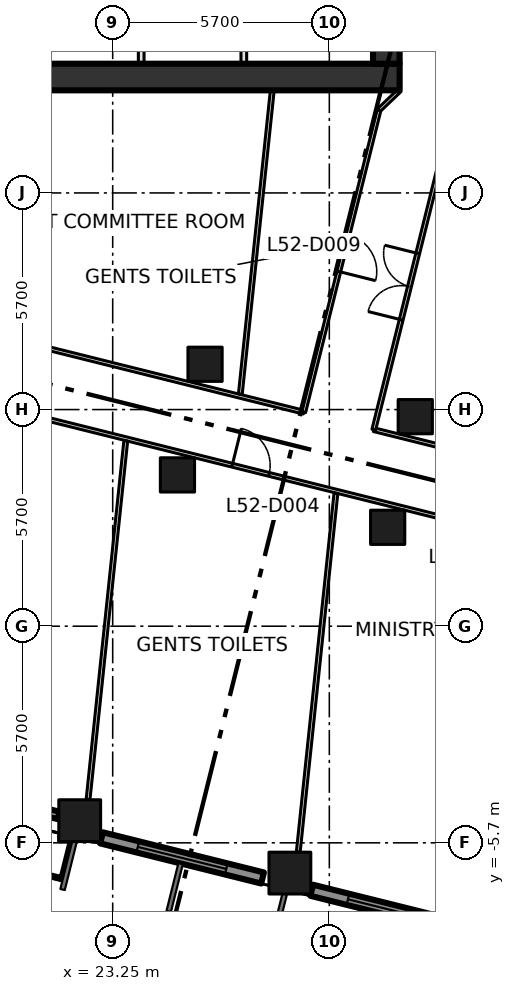
"""IFC4 building model, lengths in metres.
Left out: names, types, materials, properties, quantities, classifications, styles, units other than length and angle.
Written with IfcOpenShell. Run it as: python <this file> out.ifc"""

import sys

from ifc_helpers import new_model, si_unit, direction, frame, frame_2d, origin, origin_2d, place, context, subcontext, project, spatial, rectangle, extrude, element, fill, save


model = new_model("IFC4")
c1 = context("Model", 3, precision=1e-05, world=origin(), true_north=direction((0.0, 1.0)))
c2 = subcontext(c1, "Body", "Model", "MODEL_VIEW")
j1 = project(units=[si_unit("LENGTHUNIT", "METRE"), si_unit("PLANEANGLEUNIT", "RADIAN")], contexts=[c1])
p1 = place(None, origin())
s1 = spatial("IfcSite", under=j1, at=p1, CompositionType="ELEMENT")
p2 = place(p1, origin())
s2 = spatial("IfcBuilding", under=s1, at=p2, CompositionType="ELEMENT")
p3 = place(p2, frame((0.0, 0.0, 229.8)))
s3 = spatial("IfcBuildingStorey", under=s2, at=p3, CompositionType="ELEMENT", Elevation=229.8)
for number, where, z_axis, x_axis in (
    (1, (22.382, -5.117, 0.0), (0.0, 0.0, 1.0), (1.0, 0.0, 0.0)),
    (2, (27.912, -6.496, 0.0), (0.0, 0.0, 1.0), (1.0, 0.0, 0.0)),
):
    element("IfcColumn", number, at=place(p3, frame(where, z_axis=z_axis, x_axis=x_axis)), inside=s3, PredefinedType="COLUMN", context=c2, shape_type="SweptSolid", body=[
        extrude(rectangle(XDim=1.1, YDim=1.1, at=origin_2d()), origin(), (0.0, 0.0, 1.0), 4.2),
    ])
for number, where, z_axis, x_axis in (
    (3, (24.954, 3.981, 0.0), (0.0, 0.0, 1.0), (1.0, 0.0, 0.0)),
    (4, (30.485, 2.602, 0.0), (0.0, 0.0, 1.0), (1.0, 0.0, 0.0)),
    (5, (25.68, 6.892, 0.0), (0.0, 0.0, 1.0), (1.0, 0.0, 0.0)),
    (6, (31.211, 5.513, 0.0), (0.0, 0.0, 1.0), (1.0, 0.0, 0.0)),
):
    element("IfcColumn", number, at=place(p3, frame(where, z_axis=z_axis, x_axis=x_axis)), inside=s3, PredefinedType="COLUMN", context=c2, shape_type="SweptSolid", body=[
        extrude(rectangle(XDim=0.9, YDim=0.9, at=origin_2d()), origin(), (0.0, 0.0, 1.0), 4.2),
    ])
p4 = place(p3, frame((8.0, 14.45, -0.3), z_axis=(0.0, 0.0, 1.0), x_axis=(1.0, 0.0, 0.0)))
e7 = element("IfcWall", 7, at=p4, inside=s3, PredefinedType="SHEAR", context=c2, shape_type="SweptSolid", body=[
    extrude(rectangle(XDim=22.8, YDim=0.7, at=frame_2d((11.4, 0.0))), origin(), (0.0, 0.0, 1.0), 4.2),
])
p5 = place(p4, frame((2.3, 0.0, 0.3)))
e8 = element("IfcOpeningElement", 8, at=p5, cuts=e7, PredefinedType="OPENING", context=c2, shape_type="SweptSolid", body=[
    extrude(rectangle(XDim=1.8, YDim=2.1, at=frame_2d((0.9, 1.05))), frame((0.0, 0.36, 0.0), z_axis=(0.0, -1.0, 0.0), x_axis=(1.0, 0.0, 0.0)), (0.0, 0.0, 1.0), 0.72),
])
p6 = place(p3, frame((30.45, 14.8, -0.3), z_axis=(0.0, 0.0, 1.0), x_axis=(0.0, 1.0, 0.0)))
e9 = element("IfcWall", 9, at=p6, inside=s3, PredefinedType="SHEAR", context=c2, shape_type="SweptSolid", body=[
    extrude(rectangle(XDim=20.9, YDim=0.7, at=frame_2d((10.45, 0.0))), origin(), (0.0, 0.0, 1.0), 4.2),
])
for number, where, z_axis, x_axis in (
    (10, (24.0, 14.8, 0.0), (0.0, 0.0, 1.0), (0.0, 1.0, 0.0)),
    (11, (26.7, 14.8, 0.0), (0.0, 0.0, 1.0), (0.0, 1.0, 0.0)),
):
    element("IfcWall", number, at=place(p3, frame(where, z_axis=z_axis, x_axis=x_axis)), inside=s3, PredefinedType="PARTITIONING", context=c2, shape_type="SweptSolid", body=[
        extrude(rectangle(XDim=2.825, YDim=0.15, at=frame_2d((1.413, 0.0))), origin(), (0.0, 0.0, 1.0), 3.9),
    ])
p7 = place(p3, frame((17.401, -3.875, 0.0), z_axis=(0.0, 0.0, 1.0), x_axis=(0.970286982272, -0.241956963183, 0.0)))
e12 = element("IfcWall", 12, at=p7, inside=s3, PredefinedType="SOLIDWALL", context=c2, shape_type="SweptSolid", body=[
    extrude(rectangle(XDim=4.567, YDim=0.2, at=frame_2d((2.283, 0.0))), origin(), (0.0, 0.0, 1.0), 3.15),
])
p8 = place(p7, frame((1.383, 0.0, 0.0)))
e13 = element("IfcOpeningElement", 13, at=p8, cuts=e12, PredefinedType="OPENING", context=c2, shape_type="SweptSolid", body=[
    extrude(rectangle(XDim=1.8, YDim=2.9, at=frame_2d((0.9, 1.45))), frame((0.0, 0.11, 0.0), z_axis=(0.0, -1.0, 0.0), x_axis=(1.0, 0.0, 0.0)), (0.0, 0.0, 1.0), 0.22),
])
p9 = place(p3, frame((16.694, -5.069, 0.0), z_axis=(0.0, 0.0, 1.0), x_axis=(0.970289679319, -0.241946147329, 0.0)))
e14 = element("IfcWall", 14, at=p9, inside=s3, PredefinedType="SOLIDWALL", context=c2, shape_type="SweptSolid", body=[
    extrude(rectangle(XDim=5.36, YDim=0.4, at=frame_2d((2.68, 0.0))), origin(), (0.0, 0.0, 1.0), 0.3),
])
p10 = place(p3, frame((22.956, -5.569, 0.0), z_axis=(0.0, 0.0, 1.0), x_axis=(0.970323116569, -0.241812012628, 0.0)))
e15 = element("IfcWall", 15, at=p10, inside=s3, PredefinedType="SOLIDWALL", context=c2, shape_type="SweptSolid", body=[
    extrude(rectangle(XDim=4.367, YDim=0.3, at=frame_2d((2.183, 0.0))), origin(), (0.0, 0.0, 1.0), 3.15),
])
p11 = place(p10, frame((0.983, 0.0, 0.8)))
e16 = element("IfcOpeningElement", 16, at=p11, cuts=e15, PredefinedType="OPENING", context=c2, shape_type="SweptSolid", body=[
    extrude(rectangle(XDim=2.4, YDim=2.1, at=frame_2d((1.2, 1.05))), frame((0.0, 0.16, 0.0), z_axis=(0.0, -1.0, 0.0), x_axis=(1.0, 0.0, 0.0)), (0.0, 0.0, 1.0), 0.32),
])
p12 = place(p3, frame((28.486, -6.948, 0.0), z_axis=(0.0, 0.0, 1.0), x_axis=(0.970336189295, -0.241759549438, 0.0)))
e17 = element("IfcWall", 17, at=p12, inside=s3, PredefinedType="SOLIDWALL", context=c2, shape_type="SweptSolid", body=[
    extrude(rectangle(XDim=4.368, YDim=0.3, at=frame_2d((2.184, 0.0))), origin(), (0.0, 0.0, 1.0), 3.15),
])
p13 = place(p12, frame((0.983, 0.0, 0.8)))
e18 = element("IfcOpeningElement", 18, at=p13, cuts=e17, PredefinedType="OPENING", context=c2, shape_type="SweptSolid", body=[
    extrude(rectangle(XDim=2.4, YDim=2.1, at=frame_2d((1.2, 1.05))), frame((0.0, 0.16, 0.0), z_axis=(0.0, -1.0, 0.0), x_axis=(1.0, 0.0, 0.0)), (0.0, 0.0, 1.0), 0.32),
])
p14 = place(p3, frame((8.55, 8.685, 0.0), z_axis=(0.0, 0.0, 1.0), x_axis=(0.970297101369, -0.241916380335, 0.0)))
e19 = element("IfcWall", 19, at=p14, inside=s3, PredefinedType="PARTITIONING", context=c2, shape_type="SweptSolid", body=[
    extrude(rectangle(XDim=51.675, YDim=0.1, at=frame_2d((25.837, 0.0))), origin(), (0.0, 0.0, 1.0), 3.9),
])
p15 = place(p14, frame((18.391, 0.0, 0.0)))
e20 = element("IfcOpeningElement", 20, at=p15, cuts=e19, PredefinedType="OPENING", context=c2, shape_type="SweptSolid", body=[
    extrude(rectangle(XDim=1.0, YDim=2.1, at=frame_2d((0.5, 1.05))), frame((0.0, 0.06, 0.0), z_axis=(0.0, -1.0, 0.0), x_axis=(1.0, 0.0, 0.0)), (0.0, 0.0, 1.0), 0.12),
])
p16 = place(p14, frame((24.69, 0.0, 0.0)))
e21 = element("IfcOpeningElement", 21, at=p16, cuts=e19, PredefinedType="OPENING", context=c2, shape_type="SweptSolid", body=[
    extrude(rectangle(XDim=1.0, YDim=2.1, at=frame_2d((0.5, 1.05))), frame((0.0, 0.06, 0.0), z_axis=(0.0, -1.0, 0.0), x_axis=(1.0, 0.0, 0.0)), (0.0, 0.0, 1.0), 0.12),
])
p17 = place(p14, frame((29.99, 0.0, 0.0)))
e22 = element("IfcOpeningElement", 22, at=p17, cuts=e19, PredefinedType="OPENING", context=c2, shape_type="SweptSolid", body=[
    extrude(rectangle(XDim=1.8, YDim=2.1, at=frame_2d((0.9, 1.05))), frame((0.0, 0.06, 0.0), z_axis=(0.0, -1.0, 0.0), x_axis=(1.0, 0.0, 0.0)), (0.0, 0.0, 1.0), 0.12),
])
p18 = place(p14, frame((6.58, 0.0, 0.0)))
e23 = element("IfcOpeningElement", 23, at=p18, cuts=e19, PredefinedType="OPENING", context=c2, shape_type="SweptSolid", body=[
    extrude(rectangle(XDim=1.8, YDim=2.1, at=frame_2d((0.9, 1.05))), frame((0.0, 0.06, 0.0), z_axis=(0.0, -1.0, 0.0), x_axis=(1.0, 0.0, 0.0)), (0.0, 0.0, 1.0), 0.12),
])
p19 = place(p3, frame((8.988, 10.44, 0.0), z_axis=(0.0, 0.0, 1.0), x_axis=(0.970301223092, -0.241899848006, 0.0)))
e24 = element("IfcWall", 24, at=p19, inside=s3, PredefinedType="PARTITIONING", context=c2, shape_type="SweptSolid", body=[
    extrude(rectangle(XDim=19.879, YDim=0.1, at=frame_2d((9.94, 0.0))), origin(), (0.0, 0.0, 1.0), 3.9),
])
p20 = place(p3, frame((30.12, 5.171, 0.0), z_axis=(0.0, 0.0, 1.0), x_axis=(0.970303642594, -0.241890142767, 0.0)))
e25 = element("IfcWall", 25, at=p20, inside=s3, PredefinedType="PARTITIONING", context=c2, shape_type="SweptSolid", body=[
    extrude(rectangle(XDim=20.026, YDim=0.1, at=frame_2d((10.013, 0.0))), origin(), (0.0, 0.0, 1.0), 3.9),
])
p21 = place(p3, frame((30.12, 5.171, 0.0), z_axis=(0.0, 0.0, 1.0), x_axis=(0.241902913229, 0.970300458915, 0.0)))
e26 = element("IfcWall", 26, at=p21, inside=s3, PredefinedType="PARTITIONING", context=c2, shape_type="SweptSolid", body=[
    extrude(rectangle(XDim=8.172, YDim=0.1, at=frame_2d((4.086, 0.0))), origin(), (0.0, 0.0, 1.0), 3.9),
])
p22 = place(p21, frame((2.98, 0.0, 0.0)))
e27 = element("IfcOpeningElement", 27, at=p22, cuts=e26, PredefinedType="OPENING", context=c2, shape_type="SweptSolid", body=[
    extrude(rectangle(XDim=1.8, YDim=2.1, at=frame_2d((0.9, 1.05))), frame((0.0, 0.06, 0.0), z_axis=(0.0, -1.0, 0.0), x_axis=(1.0, 0.0, 0.0)), (0.0, 0.0, 1.0), 0.12),
])
p23 = place(p3, frame((30.259, 13.583, 0.0), z_axis=(0.0, 0.0, 1.0), x_axis=(-0.241841612879, -0.970315739479, 0.0)))
e28 = element("IfcWall", 28, at=p23, inside=s3, PredefinedType="PARTITIONING", context=c2, shape_type="SweptSolid", body=[
    extrude(rectangle(XDim=8.195, YDim=0.1, at=frame_2d((4.098, 0.0))), origin(), (0.0, 0.0, 1.0), 3.9),
])
p24 = place(p23, frame((3.38, 0.0, 0.0)))
e29 = element("IfcOpeningElement", 29, at=p24, cuts=e28, PredefinedType="OPENING", context=c2, shape_type="SweptSolid", body=[
    extrude(rectangle(XDim=1.0, YDim=2.1, at=frame_2d((0.5, 1.05))), frame((0.0, 0.06, 0.0), z_axis=(0.0, -1.0, 0.0), x_axis=(1.0, 0.0, 0.0)), (0.0, 0.0, 1.0), 0.12),
])
p25 = place(p3, frame((30.8, 14.1, 0.0), z_axis=(0.0, 0.0, 1.0), x_axis=(-0.722911025189, -0.690941133281, 0.0)))
e30 = element("IfcWall", 30, at=p25, inside=s3, PredefinedType="PARTITIONING", context=c2, shape_type="SweptSolid", body=[
    extrude(rectangle(XDim=0.748, YDim=0.1, at=frame_2d((0.374, 0.0))), origin(), (0.0, 0.0, 1.0), 3.9),
])
p26 = place(p3, frame((22.601, -4.567, 0.0), z_axis=(0.0, 0.0, 1.0), x_axis=(0.104573690763, 0.994517140727, 0.0)))
e31 = element("IfcWall", 31, at=p26, inside=s3, PredefinedType="PARTITIONING", context=c2, shape_type="SweptSolid", body=[
    extrude(rectangle(XDim=9.495, YDim=0.1, at=frame_2d((4.748, 0.0))), origin(), (0.0, 0.0, 1.0), 3.9),
])
p27 = place(p3, frame((26.608, 6.105, 0.0), z_axis=(0.0, 0.0, 1.0), x_axis=(0.104619970127, 0.994512273353, 0.0)))
e32 = element("IfcWall", 32, at=p27, inside=s3, PredefinedType="PARTITIONING", context=c2, shape_type="SweptSolid", body=[
    extrude(rectangle(XDim=8.039, YDim=0.1, at=frame_2d((4.02, 0.0))), origin(), (0.0, 0.0, 1.0), 3.9),
])
p28 = place(p3, frame((28.132, -5.946, 0.0), z_axis=(0.0, 0.0, 1.0), x_axis=(0.104469291407, 0.994528112802, 0.0)))
e33 = element("IfcWall", 33, at=p28, inside=s3, PredefinedType="PARTITIONING", context=c2, shape_type="SweptSolid", body=[
    extrude(rectangle(XDim=9.495, YDim=0.1, at=frame_2d((4.748, 0.0))), origin(), (0.0, 0.0, 1.0), 3.9),
])
p29 = place(p11, origin())
e34 = element("IfcWindow", 34, at=p29, inside=s3, PartitioningType="DOUBLE_PANEL_VERTICAL", PredefinedType="WINDOW", context=c2, shape_type="SweptSolid", body=[
    extrude(rectangle(XDim=2.4, YDim=2.1, at=frame_2d((1.2, 1.05))), frame((0.0, 0.03, 0.0), z_axis=(0.0, -1.0, 0.0), x_axis=(1.0, 0.0, 0.0)), (0.0, 0.0, 1.0), 0.06),
])
fill(e16, e34)
p30 = place(p13, origin())
e35 = element("IfcWindow", 35, at=p30, inside=s3, PartitioningType="DOUBLE_PANEL_VERTICAL", PredefinedType="WINDOW", context=c2, shape_type="SweptSolid", body=[
    extrude(rectangle(XDim=2.4, YDim=2.1, at=frame_2d((1.2, 1.05))), frame((0.0, 0.03, 0.0), z_axis=(0.0, -1.0, 0.0), x_axis=(1.0, 0.0, 0.0)), (0.0, 0.0, 1.0), 0.06),
])
fill(e18, e35)
p31 = place(p15, origin())
e36 = element("IfcDoor", 36, at=p31, inside=s3, OperationType="SINGLE_SWING_LEFT", PredefinedType="DOOR", context=c2, shape_type="SweptSolid", body=[
    extrude(rectangle(XDim=1.0, YDim=2.1, at=frame_2d((0.5, 1.05))), frame((0.0, 0.025, 0.0), z_axis=(0.0, -1.0, 0.0), x_axis=(1.0, 0.0, 0.0)), (0.0, 0.0, 1.0), 0.05),
])
fill(e20, e36)
p32 = place(p24, origin())
e37 = element("IfcDoor", 37, at=p32, inside=s3, OperationType="SINGLE_SWING_RIGHT", PredefinedType="DOOR", context=c2, shape_type="SweptSolid", body=[
    extrude(rectangle(XDim=1.0, YDim=2.1, at=frame_2d((0.5, 1.05))), frame((0.0, 0.025, 0.0), z_axis=(0.0, -1.0, 0.0), x_axis=(1.0, 0.0, 0.0)), (0.0, 0.0, 1.0), 0.05),
])
fill(e29, e37)
p33 = place(p22, origin())
e38 = element("IfcDoor", 38, at=p33, inside=s3, OperationType="DOUBLE_DOOR_SINGLE_SWING", PredefinedType="DOOR", context=c2, shape_type="SweptSolid", body=[
    extrude(rectangle(XDim=1.8, YDim=2.1, at=frame_2d((0.9, 1.05))), frame((0.0, 0.025, 0.0), z_axis=(0.0, -1.0, 0.0), x_axis=(1.0, 0.0, 0.0)), (0.0, 0.0, 1.0), 0.05),
])
fill(e27, e38)
save(model, sys.argv[1])
